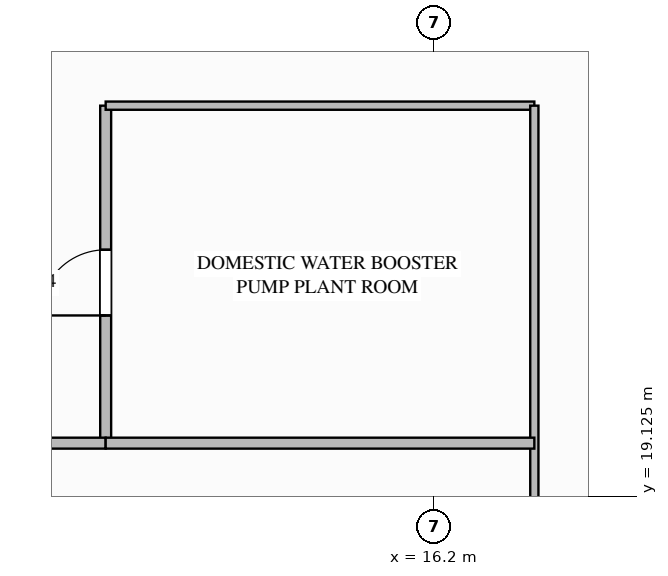
"""IFC4 building model, lengths in metres.
Left out: names, types, materials, properties, quantities, classifications, styles, units other than length and angle.
Written with IfcOpenShell. Run it as: python <this file> out.ifc"""

import sys

from ifc_helpers import new_model, si_unit, direction, frame, frame_2d, origin, place, context, subcontext, project, spatial, rectangle, extrude, element, fill, save


model = new_model("IFC4")
c1 = context("Model", 3, precision=1e-05, world=origin(), true_north=direction((0.0, 1.0)))
c2 = subcontext(c1, "Body", "Model", "MODEL_VIEW")
j1 = project(units=[si_unit("LENGTHUNIT", "METRE"), si_unit("PLANEANGLEUNIT", "RADIAN")], contexts=[c1])
p1 = place(None, origin())
s1 = spatial("IfcSite", under=j1, at=p1, CompositionType="ELEMENT")
p2 = place(p1, origin())
s2 = spatial("IfcBuilding", under=s1, at=p2, CompositionType="ELEMENT")
p3 = place(p2, frame((0.0, 0.0, 140.8)))
s3 = spatial("IfcBuildingStorey", under=s2, at=p3, CompositionType="ELEMENT", Elevation=140.8)
p4 = place(p3, frame((10.8, 20.0, 0.0), z_axis=(0.0, 0.0, 1.0), x_axis=(0.0, 1.0, 0.0)))
e1 = element("IfcWall", 1, at=p4, inside=s3, PredefinedType="SOLIDWALL", context=c2, shape_type="SweptSolid", body=[
    extrude(rectangle(XDim=5.55, YDim=0.18, at=frame_2d((2.775, 0.0))), origin(), (0.0, 0.0, 1.0), 4.7),
])
p5 = place(p4, frame((2.1, 0.0, 0.0)))
e2 = element("IfcOpeningElement", 2, at=p5, cuts=e1, PredefinedType="OPENING", context=c2, shape_type="SweptSolid", body=[
    extrude(rectangle(XDim=1.08, YDim=2.04, at=frame_2d((0.54, 1.02))), frame((0.0, 0.1, 0.0), z_axis=(0.0, -1.0, 0.0), x_axis=(1.0, 0.0, 0.0)), (0.0, 0.0, 1.0), 0.2),
])
p6 = place(p3, frame((8.7, 20.0, 0.0), z_axis=(0.0, 0.0, 1.0), x_axis=(1.0, 0.0, 0.0)))
e3 = element("IfcWall", 3, at=p6, inside=s3, PredefinedType="SOLIDWALL", context=c2, shape_type="SweptSolid", body=[
    extrude(rectangle(XDim=2.1, YDim=0.18, at=frame_2d((1.05, 0.0))), origin(), (0.0, 0.0, 1.0), 4.7),
])
p7 = place(p3, frame((10.8, 25.55, 0.0), z_axis=(0.0, 0.0, 1.0), x_axis=(1.0, 0.0, 0.0)))
e4 = element("IfcWall", 4, at=p7, inside=s3, PredefinedType="PARTITIONING", context=c2, shape_type="SweptSolid", body=[
    extrude(rectangle(XDim=7.05, YDim=0.135, at=frame_2d((3.525, 0.0))), origin(), (0.0, 0.0, 1.0), 4.7),
])
p8 = place(p3, frame((17.85, 8.8, 0.0), z_axis=(0.0, 0.0, 1.0), x_axis=(0.0, 1.0, 0.0)))
e5 = element("IfcWall", 5, at=p8, inside=s3, PredefinedType="PARTITIONING", context=c2, shape_type="SweptSolid", body=[
    extrude(rectangle(XDim=16.75, YDim=0.135, at=frame_2d((8.375, 0.0))), origin(), (0.0, 0.0, 1.0), 4.7),
])
p9 = place(p3, frame((10.8, 20.0, 0.0), z_axis=(0.0, 0.0, 1.0), x_axis=(1.0, 0.0, 0.0)))
e6 = element("IfcWall", 6, at=p9, inside=s3, PredefinedType="SOLIDWALL", context=c2, shape_type="SweptSolid", body=[
    extrude(rectangle(XDim=7.05, YDim=0.18, at=frame_2d((3.525, 0.0))), origin(), (0.0, 0.0, 1.0), 4.7),
])
p10 = place(p5, origin())
e7 = element("IfcDoor", 7, at=p10, inside=s3, OperationType="SINGLE_SWING_LEFT", PredefinedType="DOOR", context=c2, shape_type="SweptSolid", body=[
    extrude(rectangle(XDim=1.08, YDim=2.04, at=frame_2d((0.54, 1.02))), frame((0.0, 0.025, 0.0), z_axis=(0.0, -1.0, 0.0), x_axis=(1.0, 0.0, 0.0)), (0.0, 0.0, 1.0), 0.05),
])
fill(e2, e7)
save(model, sys.argv[1])
